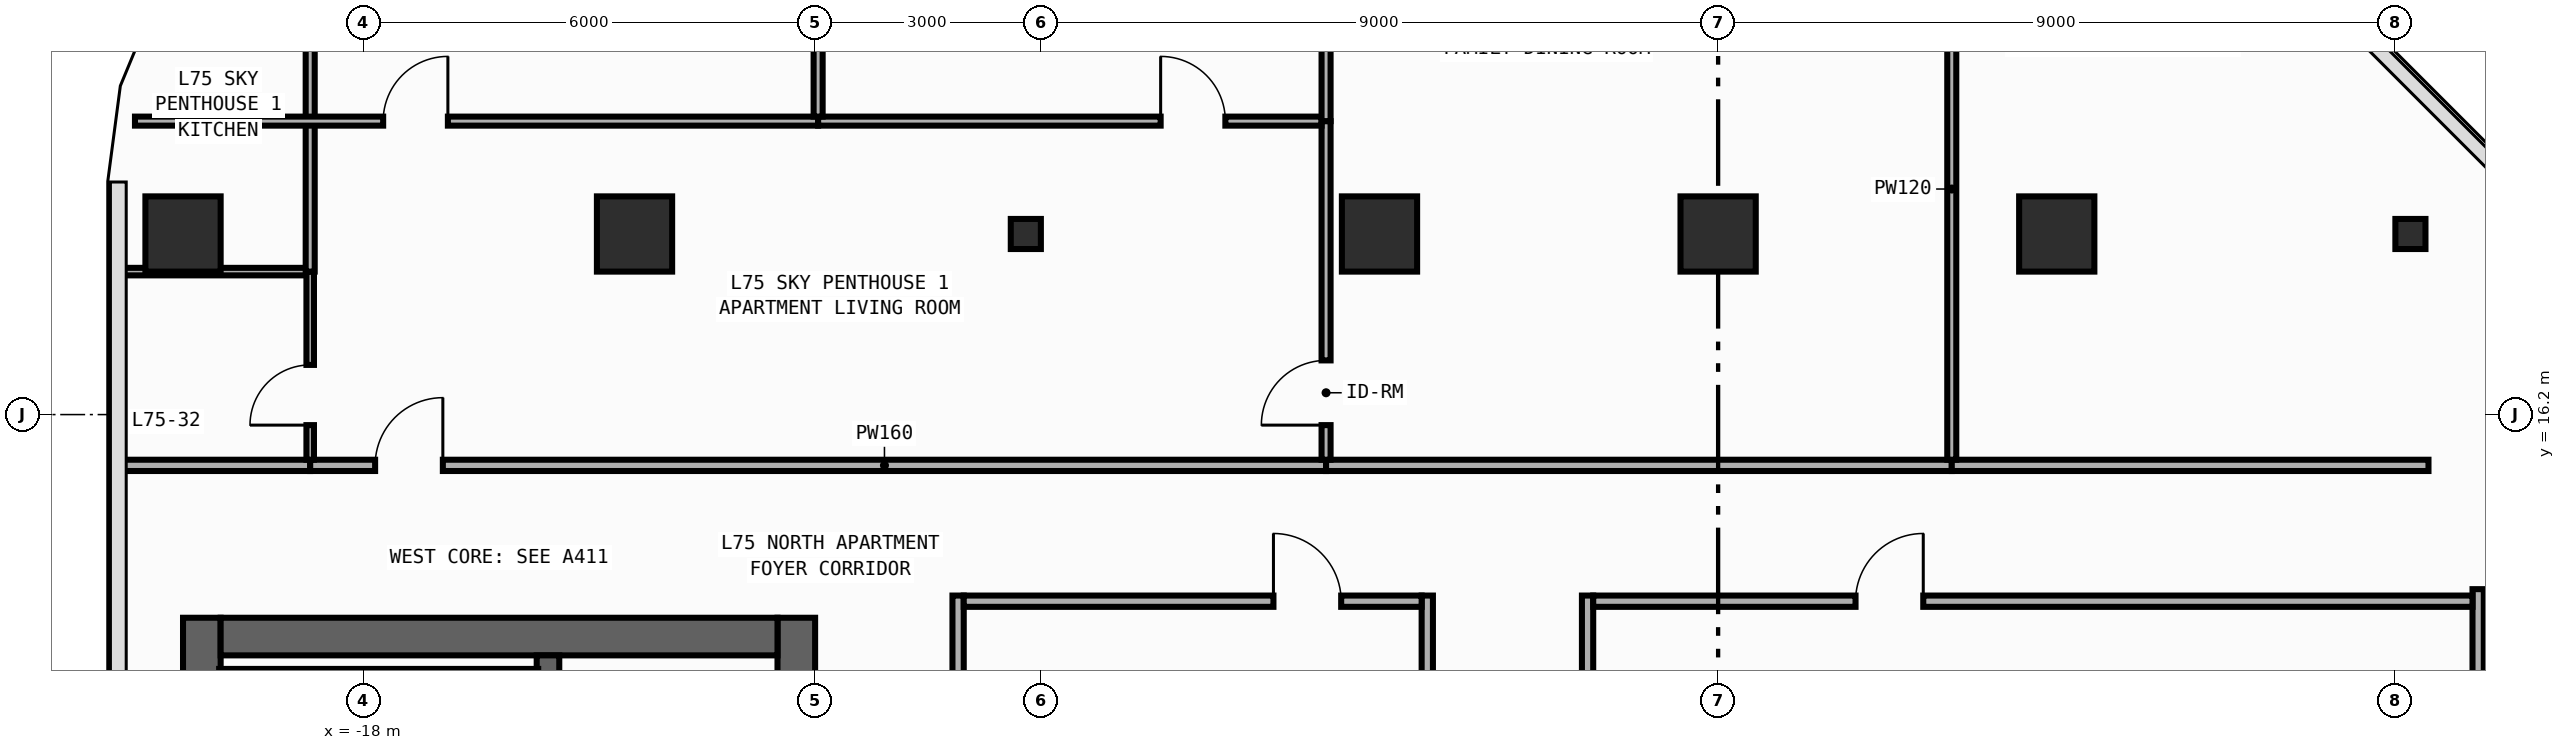
"""IFC4 building model, lengths in metres.
Left out: names, types, materials, properties, quantities, classifications, styles, units other than length and angle.
Written with IfcOpenShell. Run it as: python <this file> out.ifc"""

import sys

from ifc_helpers import new_model, si_unit, direction, frame, frame_2d, origin, origin_2d, place, context, subcontext, project, spatial, rectangle, circle, i_section, extrude, element, fill, save


model = new_model("IFC4")
c1 = context("Model", 3, precision=1e-05, world=origin(), true_north=direction((0.0, 1.0)))
c2 = subcontext(c1, "Body", "Model", "MODEL_VIEW")
j1 = project(units=[si_unit("LENGTHUNIT", "METRE"), si_unit("PLANEANGLEUNIT", "RADIAN")], contexts=[c1])
p1 = place(None, origin())
s1 = spatial("IfcSite", under=j1, at=p1, CompositionType="ELEMENT")
p2 = place(p1, origin())
s2 = spatial("IfcBuilding", under=s1, at=p2, CompositionType="ELEMENT")
p3 = place(p2, frame((0.0, 0.0, 311.8)))
s3 = spatial("IfcBuildingStorey", under=s2, at=p3, CompositionType="ELEMENT", Elevation=311.8)
p4 = place(p3, frame((-20.15, -13.5, 0.0), z_axis=(0.0, 0.0, 1.0), x_axis=(0.0, 1.0, 0.0)))
e1 = element("IfcWall", 1, at=p4, inside=s3, PredefinedType="SHEAR", context=c2, shape_type="SweptSolid", body=[
    extrude(rectangle(XDim=27.0, YDim=0.5, at=frame_2d((13.5, 0.0))), origin(), (0.0, 0.0, 1.0), 3.54),
])
p5 = place(p3, frame((-12.25, -13.5, 0.0), z_axis=(0.0, 0.0, 1.0), x_axis=(0.0, 1.0, 0.0)))
e2 = element("IfcWall", 2, at=p5, inside=s3, PredefinedType="SHEAR", context=c2, shape_type="SweptSolid", body=[
    extrude(rectangle(XDim=27.0, YDim=0.5, at=frame_2d((13.5, 0.0))), origin(), (0.0, 0.0, 1.0), 3.54),
])
p6 = place(p5, frame((15.175, 0.0, 0.0)))
e3 = element("IfcOpeningElement", 3, at=p6, cuts=e2, PredefinedType="OPENING", context=c2, shape_type="SweptSolid", body=[
    extrude(rectangle(XDim=0.85, YDim=2.1, at=frame_2d((0.425, 1.05))), frame((0.0, 0.26, 0.0), z_axis=(0.0, -1.0, 0.0), x_axis=(1.0, 0.0, 0.0)), (0.0, 0.0, 1.0), 0.52),
])
p7 = place(p5, frame((21.275, 0.0, 0.0)))
e4 = element("IfcOpeningElement", 4, at=p7, cuts=e2, PredefinedType="OPENING", context=c2, shape_type="SweptSolid", body=[
    extrude(rectangle(XDim=0.85, YDim=2.1, at=frame_2d((0.425, 1.05))), frame((0.0, 0.26, 0.0), z_axis=(0.0, -1.0, 0.0), x_axis=(1.0, 0.0, 0.0)), (0.0, 0.0, 1.0), 0.52),
])
p8 = place(p5, frame((4.275, 0.0, 0.0)))
e5 = element("IfcOpeningElement", 5, at=p8, cuts=e2, PredefinedType="OPENING", context=c2, shape_type="SweptSolid", body=[
    extrude(rectangle(XDim=0.85, YDim=2.1, at=frame_2d((0.425, 1.05))), frame((0.0, 0.26, 0.0), z_axis=(0.0, -1.0, 0.0), x_axis=(1.0, 0.0, 0.0)), (0.0, 0.0, 1.0), 0.52),
])
p9 = place(p5, frame((10.275, 0.0, 0.0)))
e6 = element("IfcOpeningElement", 6, at=p9, cuts=e2, PredefinedType="OPENING", context=c2, shape_type="SweptSolid", body=[
    extrude(rectangle(XDim=0.85, YDim=2.1, at=frame_2d((0.425, 1.05))), frame((0.0, 0.26, 0.0), z_axis=(0.0, -1.0, 0.0), x_axis=(1.0, 0.0, 0.0)), (0.0, 0.0, 1.0), 0.52),
])
p10 = place(p5, frame((12.725, 0.0, 0.0)))
e7 = element("IfcOpeningElement", 7, at=p10, cuts=e2, PredefinedType="OPENING", context=c2, shape_type="SweptSolid", body=[
    extrude(rectangle(XDim=1.15, YDim=2.2, at=frame_2d((0.575, 1.1))), frame((0.0, 0.26, 0.0), z_axis=(0.0, -1.0, 0.0), x_axis=(1.0, 0.0, 0.0)), (0.0, 0.0, 1.0), 0.52),
])
p11 = place(p5, frame((1.625, 0.0, 0.0)))
e8 = element("IfcOpeningElement", 8, at=p11, cuts=e2, PredefinedType="OPENING", context=c2, shape_type="SweptSolid", body=[
    extrude(rectangle(XDim=0.85, YDim=2.1, at=frame_2d((0.425, 1.05))), frame((0.0, 0.26, 0.0), z_axis=(0.0, -1.0, 0.0), x_axis=(1.0, 0.0, 0.0)), (0.0, 0.0, 1.0), 0.52),
])
p12 = place(p3, frame((-19.9, 13.25, 0.0), z_axis=(0.0, 0.0, 1.0), x_axis=(1.0, 0.0, 0.0)))
e9 = element("IfcWall", 9, at=p12, inside=s3, PredefinedType="SHEAR", context=c2, shape_type="SweptSolid", body=[
    extrude(rectangle(XDim=7.4, YDim=0.5, at=frame_2d((3.7, 0.0))), origin(), (0.0, 0.0, 1.0), 3.54),
])
p13 = place(p3, frame((-15.55, -13.0, 0.0), z_axis=(0.0, 0.0, 1.0), x_axis=(0.0, 1.0, 0.0)))
e10 = element("IfcWall", 10, at=p13, inside=s3, PredefinedType="SHEAR", context=c2, shape_type="SweptSolid", body=[
    extrude(rectangle(XDim=26.0, YDim=0.3, at=frame_2d((13.0, 0.0))), origin(), (0.0, 0.0, 1.0), 3.54),
])
p14 = place(p13, frame((12.225, 0.0, 0.0)))
e11 = element("IfcOpeningElement", 11, at=p14, cuts=e10, PredefinedType="OPENING", context=c2, shape_type="SweptSolid", body=[
    extrude(rectangle(XDim=1.15, YDim=2.2, at=frame_2d((0.575, 1.1))), frame((0.0, 0.16, 0.0), z_axis=(0.0, -1.0, 0.0), x_axis=(1.0, 0.0, 0.0)), (0.0, 0.0, 1.0), 0.32),
])
p15 = place(p13, frame((1.125, 0.0, 0.0)))
e12 = element("IfcOpeningElement", 12, at=p15, cuts=e10, PredefinedType="OPENING", context=c2, shape_type="SweptSolid", body=[
    extrude(rectangle(XDim=0.85, YDim=2.1, at=frame_2d((0.425, 1.05))), frame((0.0, 0.16, 0.0), z_axis=(0.0, -1.0, 0.0), x_axis=(1.0, 0.0, 0.0)), (0.0, 0.0, 1.0), 0.32),
])
p16 = place(p3, frame((-19.92, 12.71, 0.0), z_axis=(0.0, 0.0, 1.0), x_axis=(1.0, 0.0, 0.0)))
e13 = element("IfcWall", 13, at=p16, inside=s3, PredefinedType="SHEAR", context=c2, shape_type="SweptSolid", body=[
    extrude(rectangle(XDim=4.24, YDim=0.22, at=frame_2d((2.12, 0.0))), origin(), (0.0, 0.0, 1.0), 3.54),
])
for number, where, z_axis, x_axis in (
    (14, (-9.2, 18.6, 0.0), (0.0, 0.0, 1.0), (1.0, 0.0, 0.0)),
    (15, (9.2, 18.6, 0.0), (0.0, 0.0, 1.0), (1.0, 0.0, 0.0)),
):
    element("IfcColumn", number, at=place(p3, frame(where, z_axis=z_axis, x_axis=x_axis)), inside=s3, PredefinedType="COLUMN", context=c2, shape_type="SweptSolid", body=[
        extrude(i_section(OverallWidth=0.4, OverallDepth=0.4, WebThickness=0.013, FlangeThickness=0.021, FilletRadius=0.022, at=origin_2d()), origin(), (0.0, 0.0, 1.0), 3.8),
    ])
for number, where, z_axis, x_axis in (
    (16, (-20.4, 18.6, 0.0), (0.0, 0.0, 1.0), (1.0, 0.0, 0.0)),
    (17, (-14.4, 18.6, 0.0), (0.0, 0.0, 1.0), (1.0, 0.0, 0.0)),
    (18, (-4.5, 18.6, 0.0), (0.0, 0.0, 1.0), (1.0, 0.0, 0.0)),
    (19, (0.0, 18.6, 0.0), (0.0, 0.0, 1.0), (1.0, 0.0, 0.0)),
    (20, (4.5, 18.6, 0.0), (0.0, 0.0, 1.0), (1.0, 0.0, 0.0)),
):
    element("IfcColumn", number, at=place(p3, frame(where, z_axis=z_axis, x_axis=x_axis)), inside=s3, PredefinedType="COLUMN", context=c2, shape_type="SweptSolid", body=[
        extrude(circle(Radius=0.5, at=origin_2d()), origin(), (0.0, 0.0, 1.0), 3.8),
    ])
p17 = place(p3, frame((-10.1, -1.61, 0.0), z_axis=(0.0, 0.0, 1.0), x_axis=(0.0, 1.0, 0.0)))
e21 = element("IfcWall", 21, at=p17, inside=s3, PredefinedType="PARTITIONING", context=c2, shape_type="SweptSolid", body=[
    extrude(rectangle(XDim=15.405, YDim=0.15, at=frame_2d((7.703, 0.0))), origin(), (0.0, 0.0, 1.0), 3.54),
])
p18 = place(p17, frame((6.543, 0.0, 0.0)))
e22 = element("IfcOpeningElement", 22, at=p18, cuts=e21, PredefinedType="OPENING", context=c2, shape_type="SweptSolid", body=[
    extrude(rectangle(XDim=0.9, YDim=2.15, at=frame_2d((0.45, 1.075))), frame((0.0, 0.085, 0.0), z_axis=(0.0, -1.0, 0.0), x_axis=(1.0, 0.0, 0.0)), (0.0, 0.0, 1.0), 0.17),
])
p19 = place(p3, frame((10.1, -1.61, 0.0), z_axis=(0.0, 0.0, 1.0), x_axis=(0.0, 1.0, 0.0)))
e23 = element("IfcWall", 23, at=p19, inside=s3, PredefinedType="PARTITIONING", context=c2, shape_type="SweptSolid", body=[
    extrude(rectangle(XDim=15.49, YDim=0.15, at=frame_2d((7.745, 0.0))), origin(), (0.0, 0.0, 1.0), 3.54),
])
p20 = place(p19, frame((6.491, 0.0, 0.0)))
e24 = element("IfcOpeningElement", 24, at=p20, cuts=e23, PredefinedType="OPENING", context=c2, shape_type="SweptSolid", body=[
    extrude(rectangle(XDim=0.9, YDim=2.15, at=frame_2d((0.45, 1.075))), frame((0.0, 0.085, 0.0), z_axis=(0.0, -1.0, 0.0), x_axis=(1.0, 0.0, 0.0)), (0.0, 0.0, 1.0), 0.17),
])
p21 = place(p3, frame((-3.865, -1.46, 0.0), z_axis=(0.0, 0.0, 1.0), x_axis=(0.0, 1.0, 0.0)))
e25 = element("IfcWall", 25, at=p21, inside=s3, PredefinedType="PARTITIONING", context=c2, shape_type="SweptSolid", body=[
    extrude(rectangle(XDim=15.255, YDim=0.15, at=frame_2d((7.627, 0.0))), origin(), (0.0, 0.0, 1.0), 3.54),
])
p22 = place(p21, frame((6.476, 0.0, 0.0)))
e26 = element("IfcOpeningElement", 26, at=p22, cuts=e25, PredefinedType="OPENING", context=c2, shape_type="SweptSolid", body=[
    extrude(rectangle(XDim=0.9, YDim=2.15, at=frame_2d((0.45, 1.075))), frame((0.0, 0.085, 0.0), z_axis=(0.0, -1.0, 0.0), x_axis=(1.0, 0.0, 0.0)), (0.0, 0.0, 1.0), 0.17),
])
p23 = place(p3, frame((-1.735, -1.46, 0.0), z_axis=(0.0, 0.0, 1.0), x_axis=(0.0, 1.0, 0.0)))
e27 = element("IfcWall", 27, at=p23, inside=s3, PredefinedType="PARTITIONING", context=c2, shape_type="SweptSolid", body=[
    extrude(rectangle(XDim=15.255, YDim=0.15, at=frame_2d((7.627, 0.0))), origin(), (0.0, 0.0, 1.0), 3.54),
])
p24 = place(p23, frame((6.476, 0.0, 0.0)))
e28 = element("IfcOpeningElement", 28, at=p24, cuts=e27, PredefinedType="OPENING", context=c2, shape_type="SweptSolid", body=[
    extrude(rectangle(XDim=0.9, YDim=2.15, at=frame_2d((0.45, 1.075))), frame((0.0, 0.085, 0.0), z_axis=(0.0, -1.0, 0.0), x_axis=(1.0, 0.0, 0.0)), (0.0, 0.0, 1.0), 0.17),
])
p25 = place(p3, frame((-21.255, 15.525, 0.0), z_axis=(0.0, 0.0, 1.0), x_axis=(1.0, 0.0, 0.0)))
e29 = element("IfcWall", 29, at=p25, inside=s3, PredefinedType="PARTITIONING", context=c2, shape_type="SweptSolid", body=[
    extrude(rectangle(XDim=2.545, YDim=0.15, at=frame_2d((1.272, 0.0))), origin(), (0.0, 0.0, 1.0), 3.54),
])
p26 = place(p3, frame((-18.71, 15.525, 0.0), z_axis=(0.0, 0.0, 1.0), x_axis=(1.0, 0.0, 0.0)))
e30 = element("IfcWall", 30, at=p26, inside=s3, PredefinedType="PARTITIONING", context=c2, shape_type="SweptSolid", body=[
    extrude(rectangle(XDim=13.5, YDim=0.15, at=frame_2d((6.75, 0.0))), origin(), (0.0, 0.0, 1.0), 3.54),
])
p27 = place(p26, frame((0.863, 0.0, 0.0)))
e31 = element("IfcOpeningElement", 31, at=p27, cuts=e30, PredefinedType="OPENING", context=c2, shape_type="SweptSolid", body=[
    extrude(rectangle(XDim=0.9, YDim=2.15, at=frame_2d((0.45, 1.075))), frame((0.0, 0.085, 0.0), z_axis=(0.0, -1.0, 0.0), x_axis=(1.0, 0.0, 0.0)), (0.0, 0.0, 1.0), 0.17),
])
p28 = place(p3, frame((-5.21, 15.525, 0.0), z_axis=(0.0, 0.0, 1.0), x_axis=(1.0, 0.0, 0.0)))
e32 = element("IfcWall", 32, at=p28, inside=s3, PredefinedType="PARTITIONING", context=c2, shape_type="SweptSolid", body=[
    extrude(rectangle(XDim=8.315, YDim=0.15, at=frame_2d((4.157, 0.0))), origin(), (0.0, 0.0, 1.0), 3.54),
])
p29 = place(p3, frame((3.105, 15.525, 0.0), z_axis=(0.0, 0.0, 1.0), x_axis=(1.0, 0.0, 0.0)))
e33 = element("IfcWall", 33, at=p29, inside=s3, PredefinedType="PARTITIONING", context=c2, shape_type="SweptSolid", body=[
    extrude(rectangle(XDim=6.335, YDim=0.15, at=frame_2d((3.167, 0.0))), origin(), (0.0, 0.0, 1.0), 3.54),
])
p30 = place(p3, frame((-10.025, 13.72, 0.0), z_axis=(0.0, 0.0, 1.0), x_axis=(1.0, 0.0, 0.0)))
e34 = element("IfcWall", 34, at=p30, inside=s3, PredefinedType="PARTITIONING", context=c2, shape_type="SweptSolid", body=[
    extrude(rectangle(XDim=6.085, YDim=0.15, at=frame_2d((3.042, 0.0))), origin(), (0.0, 0.0, 1.0), 3.54),
])
p31 = place(p30, frame((4.116, 0.0, 0.0)))
e35 = element("IfcOpeningElement", 35, at=p31, cuts=e34, PredefinedType="OPENING", context=c2, shape_type="SweptSolid", body=[
    extrude(rectangle(XDim=0.9, YDim=2.15, at=frame_2d((0.45, 1.075))), frame((0.0, 0.085, 0.0), z_axis=(0.0, -1.0, 0.0), x_axis=(1.0, 0.0, 0.0)), (0.0, 0.0, 1.0), 0.17),
])
p32 = place(p3, frame((-1.66, 13.72, 0.0), z_axis=(0.0, 0.0, 1.0), x_axis=(1.0, 0.0, 0.0)))
e36 = element("IfcWall", 36, at=p32, inside=s3, PredefinedType="PARTITIONING", context=c2, shape_type="SweptSolid", body=[
    extrude(rectangle(XDim=11.685, YDim=0.15, at=frame_2d((5.842, 0.0))), origin(), (0.0, 0.0, 1.0), 3.54),
])
p33 = place(p32, frame((3.486, 0.0, 0.0)))
e37 = element("IfcOpeningElement", 37, at=p33, cuts=e36, PredefinedType="OPENING", context=c2, shape_type="SweptSolid", body=[
    extrude(rectangle(XDim=0.9, YDim=2.15, at=frame_2d((0.45, 1.075))), frame((0.0, 0.085, 0.0), z_axis=(0.0, -1.0, 0.0), x_axis=(1.0, 0.0, 0.0)), (0.0, 0.0, 1.0), 0.17),
])
p34 = place(p3, frame((-21.255, 18.1, 0.0), z_axis=(0.0, 0.0, 1.0), x_axis=(1.0, 0.0, 0.0)))
e38 = element("IfcWall", 38, at=p34, inside=s3, PredefinedType="PARTITIONING", context=c2, shape_type="SweptSolid", body=[
    extrude(rectangle(XDim=2.495, YDim=0.1, at=frame_2d((1.248, 0.0))), origin(), (0.0, 0.0, 1.0), 3.54),
])
p35 = place(p3, frame((-18.71, 15.6, 0.0), z_axis=(0.0, 0.0, 1.0), x_axis=(0.0, 1.0, 0.0)))
e39 = element("IfcWall", 39, at=p35, inside=s3, PredefinedType="PARTITIONING", context=c2, shape_type="SweptSolid", body=[
    extrude(rectangle(XDim=2.5, YDim=0.1, at=frame_2d((1.25, 0.0))), origin(), (0.0, 0.0, 1.0), 3.54),
])
p36 = place(p35, frame((0.46, 0.0, 0.0)))
e40 = element("IfcOpeningElement", 40, at=p36, cuts=e39, PredefinedType="OPENING", context=c2, shape_type="SweptSolid", body=[
    extrude(rectangle(XDim=0.8, YDim=2.1, at=frame_2d((0.4, 1.05))), frame((0.0, 0.06, 0.0), z_axis=(0.0, -1.0, 0.0), x_axis=(1.0, 0.0, 0.0)), (0.0, 0.0, 1.0), 0.12),
])
p37 = place(p3, frame((-18.71, 18.1, 0.0), z_axis=(0.0, 0.0, 1.0), x_axis=(0.0, 1.0, 0.0)))
e41 = element("IfcWall", 41, at=p37, inside=s3, PredefinedType="PARTITIONING", context=c2, shape_type="SweptSolid", body=[
    extrude(rectangle(XDim=2.0, YDim=0.12, at=frame_2d((1.0, 0.0))), origin(), (0.0, 0.0, 1.0), 3.54),
])
p38 = place(p3, frame((-18.71, 20.1, 0.0), z_axis=(0.0, 0.0, 1.0), x_axis=(0.0, 1.0, 0.0)))
e42 = element("IfcWall", 42, at=p38, inside=s3, PredefinedType="PARTITIONING", context=c2, shape_type="SweptSolid", body=[
    extrude(rectangle(XDim=3.361, YDim=0.12, at=frame_2d((1.681, 0.0))), origin(), (0.0, 0.0, 1.0), 3.54),
])
p39 = place(p38, frame((2.102, 0.0, 0.0)))
e43 = element("IfcOpeningElement", 43, at=p39, cuts=e42, PredefinedType="OPENING", context=c2, shape_type="SweptSolid", body=[
    extrude(rectangle(XDim=0.8, YDim=2.1, at=frame_2d((0.4, 1.05))), frame((0.0, 0.07, 0.0), z_axis=(0.0, -1.0, 0.0), x_axis=(1.0, 0.0, 0.0)), (0.0, 0.0, 1.0), 0.14),
])
p40 = place(p3, frame((-5.21, 15.6, 0.0), z_axis=(0.0, 0.0, 1.0), x_axis=(0.0, 1.0, 0.0)))
e44 = element("IfcWall", 44, at=p40, inside=s3, PredefinedType="PARTITIONING", context=c2, shape_type="SweptSolid", body=[
    extrude(rectangle(XDim=4.5, YDim=0.12, at=frame_2d((2.25, 0.0))), origin(), (0.0, 0.0, 1.0), 3.54),
])
p41 = place(p40, frame((0.46, 0.0, 0.0)))
e45 = element("IfcOpeningElement", 45, at=p41, cuts=e44, PredefinedType="OPENING", context=c2, shape_type="SweptSolid", body=[
    extrude(rectangle(XDim=0.86, YDim=2.15, at=frame_2d((0.43, 1.075))), frame((0.0, 0.07, 0.0), z_axis=(0.0, -1.0, 0.0), x_axis=(1.0, 0.0, 0.0)), (0.0, 0.0, 1.0), 0.14),
])
p42 = place(p3, frame((-21.039, 20.1, 0.0), z_axis=(0.0, 0.0, 1.0), x_axis=(1.0, 0.0, 0.0)))
e46 = element("IfcWall", 46, at=p42, inside=s3, PredefinedType="PARTITIONING", context=c2, shape_type="SweptSolid", body=[
    extrude(rectangle(XDim=9.079, YDim=0.12, at=frame_2d((4.539, 0.0))), origin(), (0.0, 0.0, 1.0), 3.54),
])
p43 = place(p42, frame((3.298, 0.0, 0.0)))
e47 = element("IfcOpeningElement", 47, at=p43, cuts=e46, PredefinedType="OPENING", context=c2, shape_type="SweptSolid", body=[
    extrude(rectangle(XDim=0.86, YDim=2.15, at=frame_2d((0.43, 1.075))), frame((0.0, 0.07, 0.0), z_axis=(0.0, -1.0, 0.0), x_axis=(1.0, 0.0, 0.0)), (0.0, 0.0, 1.0), 0.14),
])
p44 = place(p3, frame((-11.96, 20.1, 0.0), z_axis=(0.0, 0.0, 1.0), x_axis=(1.0, 0.0, 0.0)))
e48 = element("IfcWall", 48, at=p44, inside=s3, PredefinedType="PARTITIONING", context=c2, shape_type="SweptSolid", body=[
    extrude(rectangle(XDim=6.69, YDim=0.12, at=frame_2d((3.345, 0.0))), origin(), (0.0, 0.0, 1.0), 3.54),
])
p45 = place(p44, frame((4.552, 0.0, 0.0)))
e49 = element("IfcOpeningElement", 49, at=p45, cuts=e48, PredefinedType="OPENING", context=c2, shape_type="SweptSolid", body=[
    extrude(rectangle(XDim=0.86, YDim=2.15, at=frame_2d((0.43, 1.075))), frame((0.0, 0.07, 0.0), z_axis=(0.0, -1.0, 0.0), x_axis=(1.0, 0.0, 0.0)), (0.0, 0.0, 1.0), 0.14),
])
p46 = place(p3, frame((3.105, 15.6, 0.0), z_axis=(0.0, 0.0, 1.0), x_axis=(0.0, 1.0, 0.0)))
e50 = element("IfcWall", 50, at=p46, inside=s3, PredefinedType="PARTITIONING", context=c2, shape_type="SweptSolid", body=[
    extrude(rectangle(XDim=8.455, YDim=0.12, at=frame_2d((4.228, 0.0))), origin(), (0.0, 0.0, 1.0), 3.54),
])
p47 = place(p46, frame((7.195, 0.0, 0.0)))
e51 = element("IfcOpeningElement", 51, at=p47, cuts=e50, PredefinedType="OPENING", context=c2, shape_type="SweptSolid", body=[
    extrude(rectangle(XDim=0.8, YDim=2.1, at=frame_2d((0.4, 1.05))), frame((0.0, 0.07, 0.0), z_axis=(0.0, -1.0, 0.0), x_axis=(1.0, 0.0, 0.0)), (0.0, 0.0, 1.0), 0.14),
])
p48 = place(p3, frame((-5.21, 20.1, 0.0), z_axis=(0.0, 0.0, 1.0), x_axis=(0.0, 1.0, 0.0)))
e52 = element("IfcWall", 52, at=p48, inside=s3, PredefinedType="PARTITIONING", context=c2, shape_type="SweptSolid", body=[
    extrude(rectangle(XDim=3.955, YDim=0.12, at=frame_2d((1.978, 0.0))), origin(), (0.0, 0.0, 1.0), 3.54),
])
p49 = place(p3, frame((-11.96, 20.16, 0.0), z_axis=(0.0, 0.0, 1.0), x_axis=(0.0, 1.0, 0.0)))
e53 = element("IfcWall", 53, at=p49, inside=s3, PredefinedType="PARTITIONING", context=c2, shape_type="SweptSolid", body=[
    extrude(rectangle(XDim=3.895, YDim=0.12, at=frame_2d((1.948, 0.0))), origin(), (0.0, 0.0, 1.0), 3.54),
])
p50 = place(p27, origin())
e54 = element("IfcDoor", 54, at=p50, inside=s3, OperationType="SINGLE_SWING_RIGHT", PredefinedType="DOOR", context=c2, shape_type="SweptSolid", body=[
    extrude(rectangle(XDim=0.9, YDim=2.15, at=frame_2d((0.45, 1.075))), frame((0.0, 0.025, 0.0), z_axis=(0.0, -1.0, 0.0), x_axis=(1.0, 0.0, 0.0)), (0.0, 0.0, 1.0), 0.05),
])
fill(e31, e54)
p51 = place(p31, origin())
e55 = element("IfcDoor", 55, at=p51, inside=s3, OperationType="SINGLE_SWING_LEFT", PredefinedType="DOOR", context=c2, shape_type="SweptSolid", body=[
    extrude(rectangle(XDim=0.9, YDim=2.15, at=frame_2d((0.45, 1.075))), frame((0.0, 0.025, 0.0), z_axis=(0.0, -1.0, 0.0), x_axis=(1.0, 0.0, 0.0)), (0.0, 0.0, 1.0), 0.05),
])
fill(e35, e55)
p52 = place(p33, origin())
e56 = element("IfcDoor", 56, at=p52, inside=s3, OperationType="SINGLE_SWING_RIGHT", PredefinedType="DOOR", context=c2, shape_type="SweptSolid", body=[
    extrude(rectangle(XDim=0.9, YDim=2.15, at=frame_2d((0.45, 1.075))), frame((0.0, 0.025, 0.0), z_axis=(0.0, -1.0, 0.0), x_axis=(1.0, 0.0, 0.0)), (0.0, 0.0, 1.0), 0.05),
])
fill(e37, e56)
p53 = place(p36, origin())
e57 = element("IfcDoor", 57, at=p53, inside=s3, OperationType="SINGLE_SWING_LEFT", PredefinedType="DOOR", context=c2, shape_type="SweptSolid", body=[
    extrude(rectangle(XDim=0.8, YDim=2.1, at=frame_2d((0.4, 1.05))), frame((0.0, 0.025, 0.0), z_axis=(0.0, -1.0, 0.0), x_axis=(1.0, 0.0, 0.0)), (0.0, 0.0, 1.0), 0.05),
])
fill(e40, e57)
p54 = place(p41, origin())
e58 = element("IfcDoor", 58, at=p54, inside=s3, OperationType="SINGLE_SWING_LEFT", PredefinedType="DOOR", context=c2, shape_type="SweptSolid", body=[
    extrude(rectangle(XDim=0.86, YDim=2.15, at=frame_2d((0.43, 1.075))), frame((0.0, 0.025, 0.0), z_axis=(0.0, -1.0, 0.0), x_axis=(1.0, 0.0, 0.0)), (0.0, 0.0, 1.0), 0.05),
])
fill(e45, e58)
p55 = place(p43, origin())
e59 = element("IfcDoor", 59, at=p55, inside=s3, OperationType="SINGLE_SWING_RIGHT", PredefinedType="DOOR", context=c2, shape_type="SweptSolid", body=[
    extrude(rectangle(XDim=0.86, YDim=2.15, at=frame_2d((0.43, 1.075))), frame((0.0, 0.025, 0.0), z_axis=(0.0, -1.0, 0.0), x_axis=(1.0, 0.0, 0.0)), (0.0, 0.0, 1.0), 0.05),
])
fill(e47, e59)
p56 = place(p45, origin())
e60 = element("IfcDoor", 60, at=p56, inside=s3, OperationType="SINGLE_SWING_LEFT", PredefinedType="DOOR", context=c2, shape_type="SweptSolid", body=[
    extrude(rectangle(XDim=0.86, YDim=2.15, at=frame_2d((0.43, 1.075))), frame((0.0, 0.025, 0.0), z_axis=(0.0, -1.0, 0.0), x_axis=(1.0, 0.0, 0.0)), (0.0, 0.0, 1.0), 0.05),
])
fill(e49, e60)
save(model, sys.argv[1])
